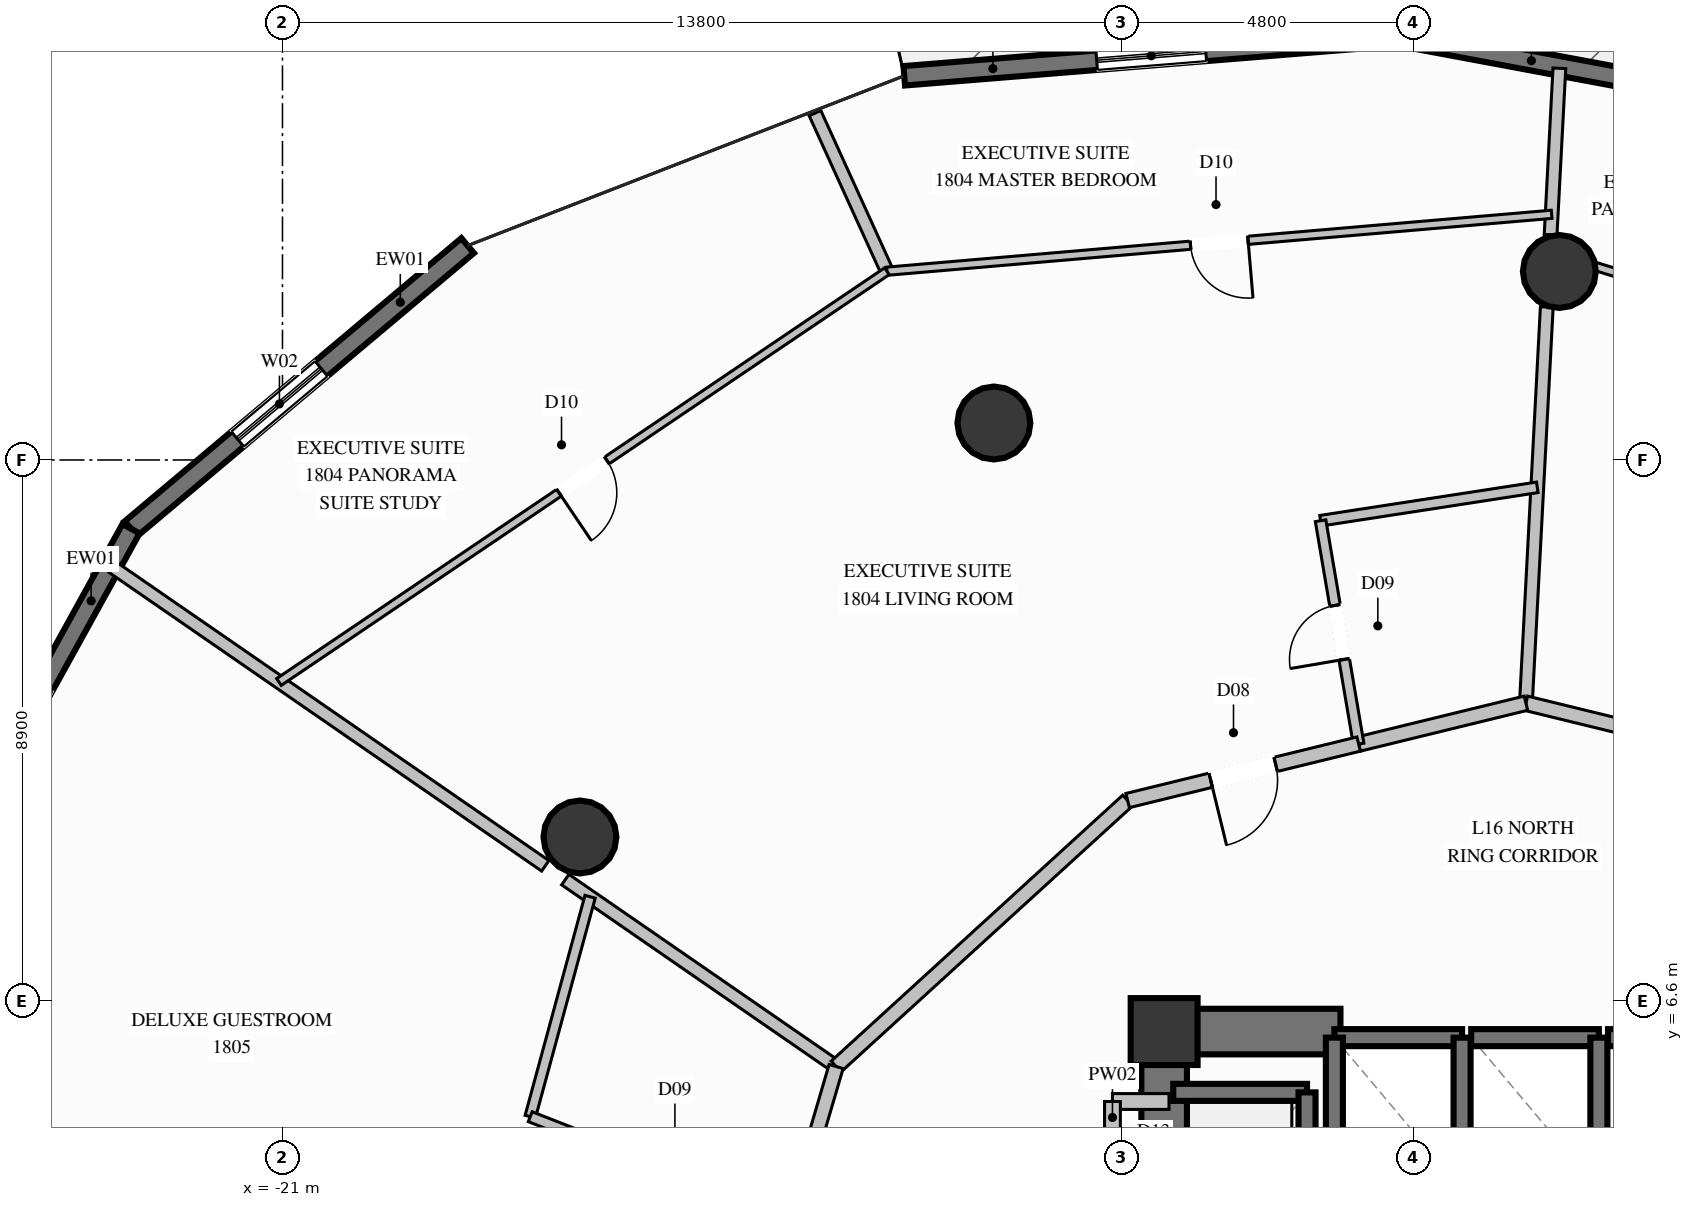
"""IFC4 building model, lengths in metres.
Left out: names, types, materials, properties, quantities, classifications, styles, units other than length and angle.
Written with IfcOpenShell. Run it as: python <this file> out.ifc"""

import sys

from ifc_helpers import new_model, si_unit, direction, frame, frame_2d, origin, origin_2d, place, context, subcontext, project, spatial, rectangle, circle, extrude, element, fill, save


model = new_model("IFC4")
c1 = context("Model", 3, precision=1e-05, world=origin(), true_north=direction((0.0, 1.0)))
c2 = subcontext(c1, "Body", "Model", "MODEL_VIEW")
j1 = project(units=[si_unit("LENGTHUNIT", "METRE"), si_unit("PLANEANGLEUNIT", "RADIAN")], contexts=[c1])
p1 = place(None, origin())
s1 = spatial("IfcSite", under=j1, at=p1, CompositionType="ELEMENT")
p2 = place(p1, origin())
s2 = spatial("IfcBuilding", under=s1, at=p2, CompositionType="ELEMENT")
p3 = place(p2, frame((0.0, 0.0, 68.0)))
s3 = spatial("IfcBuildingStorey", under=s2, at=p3, CompositionType="ELEMENT", Elevation=68.0)
p4 = place(p3, frame((-6.5, 6.1, 0.0), z_axis=(0.0, 0.0, 1.0), x_axis=(1.0, 0.0, 0.0)))
e1 = element("IfcColumn", 1, at=p4, inside=s3, PredefinedType="COLUMN", context=c2, shape_type="SweptSolid", body=[
    extrude(rectangle(XDim=1.1, YDim=1.1, at=origin_2d()), origin(), (0.0, 0.0, 1.0), 3.6),
])
p5 = place(p3, frame((-6.125, 6.1, 0.0), z_axis=(0.0, 0.0, 1.0), x_axis=(1.0, 0.0, 0.0)))
e2 = element("IfcWall", 2, at=p5, inside=s3, PredefinedType="SHEAR", context=c2, shape_type="SweptSolid", body=[
    extrude(rectangle(XDim=2.525, YDim=0.75, at=frame_2d((1.262, 0.0))), origin(), (0.0, 0.0, 1.0), 3.6),
])
p6 = place(p3, frame((-6.5, 2.35, 0.0), z_axis=(0.0, 0.0, 1.0), x_axis=(0.0, 1.0, 0.0)))
e3 = element("IfcWall", 3, at=p6, inside=s3, PredefinedType="SHEAR", context=c2, shape_type="SweptSolid", body=[
    extrude(rectangle(XDim=4.125, YDim=0.75, at=frame_2d((2.062, 0.0))), origin(), (0.0, 0.0, 1.0), 3.6),
])
for number, where, z_axis, x_axis in (
    (4, (0.0, 18.6, 0.0), (0.0, 0.0, 1.0), (1.0, 0.0, 0.0)),
    (5, (-9.3, 16.108, 0.0), (0.0, 0.0, 1.0), (1.0, 0.0, 0.0)),
    (6, (-16.108, 9.3, 0.0), (0.0, 0.0, 1.0), (1.0, 0.0, 0.0)),
):
    element("IfcColumn", number, at=place(p3, frame(where, z_axis=z_axis, x_axis=x_axis)), inside=s3, PredefinedType="COLUMN", context=c2, shape_type="SweptSolid", body=[
        extrude(circle(Radius=0.6, at=origin_2d()), origin(), (0.0, 0.0, 1.0), 3.6),
    ])
p7 = place(p3, frame((-2.651, 22.475, 0.0), z_axis=(0.0, 0.0, 1.0), x_axis=(0.983056664979, -0.183301918815, 0.0)))
e7 = element("IfcWall", 7, at=p7, inside=s3, PredefinedType="SOLIDWALL", context=c2, shape_type="SweptSolid", body=[
    extrude(rectangle(XDim=8.412, YDim=0.32, at=frame_2d((4.206, 0.0))), origin(), (0.0, 0.0, 1.0), 3.34),
])
p8 = place(p7, frame((4.708, 0.0, 0.35)))
e8 = element("IfcOpeningElement", 8, at=p8, cuts=e7, PredefinedType="OPENING", context=c2, shape_type="SweptSolid", body=[
    extrude(rectangle(XDim=1.8, YDim=2.6, at=frame_2d((0.9, 1.3))), frame((0.0, 0.17, 0.0), z_axis=(0.0, -1.0, 0.0), x_axis=(1.0, 0.0, 0.0)), (0.0, 0.0, 1.0), 0.34),
])
p9 = place(p3, frame((-10.774, 21.818, 0.0), z_axis=(0.0, 0.0, 1.0), x_axis=(0.996745267641, 0.08061557812, 0.0)))
e9 = element("IfcWall", 9, at=p9, inside=s3, PredefinedType="SOLIDWALL", context=c2, shape_type="SweptSolid", body=[
    extrude(rectangle(XDim=8.15, YDim=0.32, at=frame_2d((4.075, 0.0))), origin(), (0.0, 0.0, 1.0), 3.34),
])
p10 = place(p9, frame((3.175, 0.0, 0.35)))
e10 = element("IfcOpeningElement", 10, at=p10, cuts=e9, PredefinedType="OPENING", context=c2, shape_type="SweptSolid", body=[
    extrude(rectangle(XDim=1.8, YDim=2.6, at=frame_2d((0.9, 1.3))), frame((0.0, 0.17, 0.0), z_axis=(0.0, -1.0, 0.0), x_axis=(1.0, 0.0, 0.0)), (0.0, 0.0, 1.0), 0.34),
])
p11 = place(p3, frame((-23.491, 14.37, 0.0), z_axis=(0.0, 0.0, 1.0), x_axis=(0.765388915414, 0.643568029164, 0.0)))
e11 = element("IfcWall", 11, at=p11, inside=s3, PredefinedType="SOLIDWALL", context=c2, shape_type="SweptSolid", body=[
    extrude(rectangle(XDim=7.233, YDim=0.32, at=frame_2d((3.616, 0.0))), origin(), (0.0, 0.0, 1.0), 3.34),
])
p12 = place(p11, frame((2.289, 0.0, 0.35)))
e12 = element("IfcOpeningElement", 12, at=p12, cuts=e11, PredefinedType="OPENING", context=c2, shape_type="SweptSolid", body=[
    extrude(rectangle(XDim=1.8, YDim=2.6, at=frame_2d((0.9, 1.3))), frame((0.0, 0.17, 0.0), z_axis=(0.0, -1.0, 0.0), x_axis=(1.0, 0.0, 0.0)), (0.0, 0.0, 1.0), 0.34),
])
p13 = place(p3, frame((-26.84, 8.308, 0.0), z_axis=(0.0, 0.0, 1.0), x_axis=(0.483582354317, 0.875298867013, 0.0)))
e13 = element("IfcWall", 13, at=p13, inside=s3, PredefinedType="SOLIDWALL", context=c2, shape_type="SweptSolid", body=[
    extrude(rectangle(XDim=6.926, YDim=0.32, at=frame_2d((3.463, 0.0))), origin(), (0.0, 0.0, 1.0), 3.34),
])
p14 = place(p13, frame((2.163, 0.0, 0.35)))
e14 = element("IfcOpeningElement", 14, at=p14, cuts=e13, PredefinedType="OPENING", context=c2, shape_type="SweptSolid", body=[
    extrude(rectangle(XDim=1.8, YDim=2.6, at=frame_2d((0.9, 1.3))), frame((0.0, 0.17, 0.0), z_axis=(0.0, -1.0, 0.0), x_axis=(1.0, 0.0, 0.0)), (0.0, 0.0, 1.0), 0.34),
])
p15 = place(p3, frame((-1.6, 6.0, 0.0), z_axis=(0.0, 0.0, 1.0), x_axis=(-1.0, 0.0, 0.0)))
e15 = element("IfcWall", 15, at=p15, inside=s3, PredefinedType="SOLIDWALL", context=c2, shape_type="SweptSolid", body=[
    extrude(rectangle(XDim=2.1, YDim=0.28, at=frame_2d((1.05, 0.0))), origin(), (0.0, 0.0, 1.0), 3.34),
])
for number, where, z_axis, x_axis in (
    (16, (-3.7, 6.0, 0.0), (0.0, 0.0, 1.0), (0.0, -1.0, 0.0)),
    (17, (-1.6, 3.5, 0.0), (0.0, 0.0, 1.0), (0.0, 1.0, 0.0)),
):
    element("IfcWall", number, at=place(p3, frame(where, z_axis=z_axis, x_axis=x_axis)), inside=s3, PredefinedType="SOLIDWALL", context=c2, shape_type="SweptSolid", body=[
        extrude(rectangle(XDim=2.5, YDim=0.28, at=frame_2d((1.25, 0.0))), origin(), (0.0, 0.0, 1.0), 3.34),
    ])
p16 = place(p3, frame((0.65, 6.0, 0.0), z_axis=(0.0, 0.0, 1.0), x_axis=(-1.0, 0.0, 0.0)))
e18 = element("IfcWall", 18, at=p16, inside=s3, PredefinedType="SOLIDWALL", context=c2, shape_type="SweptSolid", body=[
    extrude(rectangle(XDim=2.1, YDim=0.28, at=frame_2d((1.05, 0.0))), origin(), (0.0, 0.0, 1.0), 3.34),
])
p17 = place(p3, frame((0.65, 3.5, 0.0), z_axis=(0.0, 0.0, 1.0), x_axis=(0.0, 1.0, 0.0)))
e19 = element("IfcWall", 19, at=p17, inside=s3, PredefinedType="SOLIDWALL", context=c2, shape_type="SweptSolid", body=[
    extrude(rectangle(XDim=2.5, YDim=0.28, at=frame_2d((1.25, 0.0))), origin(), (0.0, 0.0, 1.0), 3.34),
])
p18 = place(p3, frame((3.0, 6.0, 0.0), z_axis=(0.0, 0.0, 1.0), x_axis=(-1.0, 0.0, 0.0)))
e20 = element("IfcWall", 20, at=p18, inside=s3, PredefinedType="SOLIDWALL", context=c2, shape_type="SweptSolid", body=[
    extrude(rectangle(XDim=2.2, YDim=0.28, at=frame_2d((1.1, 0.0))), origin(), (0.0, 0.0, 1.0), 3.34),
])
p19 = place(p3, frame((-4.15, 5.1, 0.0), z_axis=(0.0, 0.0, 1.0), x_axis=(-1.0, 0.0, 0.0)))
e21 = element("IfcWall", 21, at=p19, inside=s3, PredefinedType="SOLIDWALL", context=c2, shape_type="SweptSolid", body=[
    extrude(rectangle(XDim=2.2, YDim=0.28, at=frame_2d((1.1, 0.0))), origin(), (0.0, 0.0, 1.0), 3.34),
])
p20 = place(p3, frame((-4.15, 2.4, 0.0), z_axis=(0.0, 0.0, 1.0), x_axis=(0.0, 1.0, 0.0)))
e22 = element("IfcWall", 22, at=p20, inside=s3, PredefinedType="SOLIDWALL", context=c2, shape_type="SweptSolid", body=[
    extrude(rectangle(XDim=2.7, YDim=0.28, at=frame_2d((1.35, 0.0))), origin(), (0.0, 0.0, 1.0), 3.34),
])
p21 = place(p3, frame((-7.35, 4.95, 0.0), z_axis=(0.0, 0.0, 1.0), x_axis=(1.0, 0.0, 0.0)))
e23 = element("IfcWall", 23, at=p21, inside=s3, PredefinedType="PARTITIONING", context=c2, shape_type="SweptSolid", body=[
    extrude(rectangle(XDim=0.93, YDim=0.26, at=frame_2d((0.465, 0.0))), origin(), (0.0, 0.0, 1.0), 3.34),
])
p22 = place(p3, frame((-7.35, 2.55, 0.0), z_axis=(0.0, 0.0, 1.0), x_axis=(0.0, 1.0, 0.0)))
e24 = element("IfcWall", 24, at=p22, inside=s3, PredefinedType="PARTITIONING", context=c2, shape_type="SweptSolid", body=[
    extrude(rectangle(XDim=2.4, YDim=0.26, at=frame_2d((1.2, 0.0))), origin(), (0.0, 0.0, 1.0), 2.425),
])
p23 = place(p22, frame((0.775, 0.0, 0.0)))
e25 = element("IfcOpeningElement", 25, at=p23, cuts=e24, PredefinedType="OPENING", context=c2, shape_type="SweptSolid", body=[
    extrude(rectangle(XDim=0.85, YDim=2.05, at=frame_2d((0.425, 1.025))), frame((0.0, 0.14, 0.0), z_axis=(0.0, -1.0, 0.0), x_axis=(1.0, 0.0, 0.0)), (0.0, 0.0, 1.0), 0.28),
])
p24 = place(p3, frame((-0.55, 11.5, 0.0), z_axis=(0.0, 0.0, 1.0), x_axis=(0.052578474705, 0.998616795371, 0.0)))
e26 = element("IfcWall", 26, at=p24, inside=s3, PredefinedType="PARTITIONING", context=c2, shape_type="SweptSolid", body=[
    extrude(rectangle(XDim=6.524, YDim=0.21, at=frame_2d((3.262, 0.0))), origin(), (0.0, 0.0, 1.0), 3.34),
])
p25 = place(p3, frame((-0.144, 19.203, 0.0), z_axis=(0.0, 0.0, 1.0), x_axis=(0.052535465428, 0.998619058937, 0.0)))
e27 = element("IfcWall", 27, at=p25, inside=s3, PredefinedType="PARTITIONING", context=c2, shape_type="SweptSolid", body=[
    extrude(rectangle(XDim=2.742, YDim=0.21, at=frame_2d((1.371, 0.0))), origin(), (0.0, 0.0, 1.0), 3.34),
])
p26 = place(p3, frame((-11.895, 5.525, 0.0), z_axis=(0.0, 0.0, 1.0), x_axis=(-0.823003351356, 0.56803651613, 0.0)))
e28 = element("IfcWall", 28, at=p26, inside=s3, PredefinedType="PARTITIONING", context=c2, shape_type="SweptSolid", body=[
    extrude(rectangle(XDim=5.412, YDim=0.21, at=frame_2d((2.706, 0.0))), origin(), (0.0, 0.0, 1.0), 3.34),
])
p27 = place(p3, frame((-16.678, 8.826, 0.0), z_axis=(0.0, 0.0, 1.0), x_axis=(-0.823003432382, 0.568036398735, 0.0)))
e29 = element("IfcWall", 29, at=p27, inside=s3, PredefinedType="PARTITIONING", context=c2, shape_type="SweptSolid", body=[
    extrude(rectangle(XDim=8.647, YDim=0.21, at=frame_2d((4.324, 0.0))), origin(), (0.0, 0.0, 1.0), 3.34),
])
p28 = place(p3, frame((6.0, 9.899, 0.0), z_axis=(0.0, 0.0, 1.0), x_axis=(-0.971400676792, 0.237446257348, 0.0)))
e30 = element("IfcWall", 30, at=p28, inside=s3, PredefinedType="PARTITIONING", context=c2, shape_type="SweptSolid", body=[
    extrude(rectangle(XDim=6.743, YDim=0.24, at=frame_2d((3.372, 0.0))), origin(), (0.0, 0.0, 1.0), 3.34),
])
p29 = place(p3, frame((9.324, 16.005, 0.0), z_axis=(0.0, 0.0, 1.0), x_axis=(-0.956059543069, 0.29317256029, 0.0)))
e31 = element("IfcWall", 31, at=p29, inside=s3, PredefinedType="PARTITIONING", context=c2, shape_type="SweptSolid", body=[
    extrude(rectangle(XDim=9.92, YDim=0.135, at=frame_2d((4.96, 0.0))), origin(), (0.0, 0.0, 1.0), 2.793),
])
p30 = place(p29, frame((4.485, 0.0, 0.0)))
e32 = element("IfcOpeningElement", 32, at=p30, cuts=e31, PredefinedType="OPENING", context=c2, shape_type="SweptSolid", body=[
    extrude(rectangle(XDim=0.95, YDim=2.1, at=frame_2d((0.475, 1.05))), frame((0.0, 0.078, 0.0), z_axis=(0.0, -1.0, 0.0), x_axis=(1.0, 0.0, 0.0)), (0.0, 0.0, 1.0), 0.155),
])
p31 = place(p3, frame((-0.55, 11.5, 0.0), z_axis=(0.0, 0.0, 1.0), x_axis=(-0.971426839663, -0.237339198579, 0.0)))
e33 = element("IfcWall", 33, at=p31, inside=s3, PredefinedType="PARTITIONING", context=c2, shape_type="SweptSolid", body=[
    extrude(rectangle(XDim=2.832, YDim=0.24, at=frame_2d((1.416, 0.0))), origin(), (0.0, 0.0, 1.0), 3.34),
])
p32 = place(p3, frame((-0.363, 15.05, 0.0), z_axis=(0.0, 0.0, 1.0), x_axis=(-0.988339584837, -0.152265771085, 0.0)))
e34 = element("IfcWall", 34, at=p32, inside=s3, PredefinedType="PLUMBINGWALL", context=c2, shape_type="SweptSolid", body=[
    extrude(rectangle(XDim=3.606, YDim=0.175, at=frame_2d((1.803, 0.0))), origin(), (0.0, 0.0, 1.0), 3.34),
])
p33 = place(p3, frame((-3.301, 10.828, 0.0), z_axis=(0.0, 0.0, 1.0), x_axis=(-0.167999861504, 0.985787018851, 0.0)))
e35 = element("IfcWall", 35, at=p33, inside=s3, PredefinedType="PLUMBINGWALL", context=c2, shape_type="SweptSolid", body=[
    extrude(rectangle(XDim=3.726, YDim=0.175, at=frame_2d((1.863, 0.0))), origin(), (0.0, 0.0, 1.0), 3.34),
])
p34 = place(p33, frame((1.413, 0.0, 0.0)))
e36 = element("IfcOpeningElement", 36, at=p34, cuts=e35, PredefinedType="OPENING", context=c2, shape_type="SweptSolid", body=[
    extrude(rectangle(XDim=0.9, YDim=2.1, at=frame_2d((0.45, 1.05))), frame((0.0, 0.098, 0.0), z_axis=(0.0, -1.0, 0.0), x_axis=(1.0, 0.0, 0.0)), (0.0, 0.0, 1.0), 0.195),
])
p35 = place(p3, frame((-11.059, 18.604, 0.0), z_axis=(0.0, 0.0, 1.0), x_axis=(-0.414092695147, 0.910234716887, 0.0)))
e37 = element("IfcWall", 37, at=p35, inside=s3, PredefinedType="PARTITIONING", context=c2, shape_type="SweptSolid", body=[
    extrude(rectangle(XDim=2.856, YDim=0.21, at=frame_2d((1.428, 0.0))), origin(), (0.0, 0.0, 1.0), 3.34),
])
p36 = place(p3, frame((-7.1, 9.899, 0.0), z_axis=(0.0, 0.0, 1.0), x_axis=(-0.73878836807, -0.673937495028, 0.0)))
e38 = element("IfcWall", 38, at=p36, inside=s3, PredefinedType="PARTITIONING", context=c2, shape_type="SweptSolid", body=[
    extrude(rectangle(XDim=6.49, YDim=0.24, at=frame_2d((3.245, 0.0))), origin(), (0.0, 0.0, 1.0), 3.34),
])
p37 = place(p3, frame((-3.301, 10.828, 0.0), z_axis=(0.0, 0.0, 1.0), x_axis=(-0.971381725301, -0.237523775128, 0.0)))
e39 = element("IfcWall", 39, at=p37, inside=s3, PredefinedType="PARTITIONING", context=c2, shape_type="SweptSolid", body=[
    extrude(rectangle(XDim=3.911, YDim=0.24, at=frame_2d((1.956, 0.0))), origin(), (0.0, 0.0, 1.0), 3.34),
])
p38 = place(p37, frame((1.405, 0.0, 0.0)))
e40 = element("IfcOpeningElement", 40, at=p38, cuts=e39, PredefinedType="OPENING", context=c2, shape_type="SweptSolid", body=[
    extrude(rectangle(XDim=1.1, YDim=2.3, at=frame_2d((0.55, 1.15))), frame((0.0, 0.13, 0.0), z_axis=(0.0, -1.0, 0.0), x_axis=(1.0, 0.0, 0.0)), (0.0, 0.0, 1.0), 0.26),
])
p39 = place(p3, frame((-0.127, 19.54, 0.0), z_axis=(0.0, 0.0, 1.0), x_axis=(-0.996354434544, -0.085310261781, 0.0)))
e41 = element("IfcWall", 41, at=p39, inside=s3, PredefinedType="PARTITIONING", context=c2, shape_type="SweptSolid", body=[
    extrude(rectangle(XDim=10.972, YDim=0.135, at=frame_2d((5.486, 0.0))), origin(), (0.0, 0.0, 1.0), 3.34),
])
p40 = place(p39, frame((5.011, 0.0, 0.0)))
e42 = element("IfcOpeningElement", 42, at=p40, cuts=e41, PredefinedType="OPENING", context=c2, shape_type="SweptSolid", body=[
    extrude(rectangle(XDim=0.95, YDim=2.1, at=frame_2d((0.475, 1.05))), frame((0.0, 0.078, 0.0), z_axis=(0.0, -1.0, 0.0), x_axis=(1.0, 0.0, 0.0)), (0.0, 0.0, 1.0), 0.155),
])
p41 = place(p3, frame((-11.059, 18.604, 0.0), z_axis=(0.0, 0.0, 1.0), x_axis=(-0.828635640213, -0.559788331219, 0.0)))
e43 = element("IfcWall", 43, at=p41, inside=s3, PredefinedType="PARTITIONING", context=c2, shape_type="SweptSolid", body=[
    extrude(rectangle(XDim=12.067, YDim=0.135, at=frame_2d((6.033, 0.0))), origin(), (0.0, 0.0, 1.0), 3.34),
])
p42 = place(p41, frame((5.558, 0.0, 0.0)))
e44 = element("IfcOpeningElement", 44, at=p42, cuts=e43, PredefinedType="OPENING", context=c2, shape_type="SweptSolid", body=[
    extrude(rectangle(XDim=0.95, YDim=2.1, at=frame_2d((0.475, 1.05))), frame((0.0, 0.078, 0.0), z_axis=(0.0, -1.0, 0.0), x_axis=(1.0, 0.0, 0.0)), (0.0, 0.0, 1.0), 0.155),
])
p43 = place(p3, frame((-11.895, 5.525, 0.0), z_axis=(0.0, 0.0, 1.0), x_axis=(-0.281878178616, -0.9594502032, 0.0)))
e45 = element("IfcWall", 45, at=p43, inside=s3, PredefinedType="PARTITIONING", context=c2, shape_type="SweptSolid", body=[
    extrude(rectangle(XDim=2.615, YDim=0.24, at=frame_2d((1.307, 0.0))), origin(), (0.0, 0.0, 1.0), 3.34),
])
p44 = place(p3, frame((-15.941, 8.317, 0.0), z_axis=(0.0, 0.0, 1.0), x_axis=(-0.262544204064, -0.964919966066, 0.0)))
e46 = element("IfcWall", 46, at=p44, inside=s3, PredefinedType="PLUMBINGWALL", context=c2, shape_type="SweptSolid", body=[
    extrude(rectangle(XDim=3.749, YDim=0.175, at=frame_2d((1.874, 0.0))), origin(), (0.0, 0.0, 1.0), 2.793),
])
p45 = place(p3, frame((-12.632, 3.016, 0.0), z_axis=(0.0, 0.0, 1.0), x_axis=(-0.930949556546, 0.365147810026, 0.0)))
e47 = element("IfcWall", 47, at=p45, inside=s3, PredefinedType="PLUMBINGWALL", context=c2, shape_type="SweptSolid", body=[
    extrude(rectangle(XDim=4.611, YDim=0.175, at=frame_2d((2.306, 0.0))), origin(), (0.0, 0.0, 1.0), 3.34),
])
p46 = place(p45, frame((1.856, 0.0, 0.0)))
e48 = element("IfcOpeningElement", 48, at=p46, cuts=e47, PredefinedType="OPENING", context=c2, shape_type="SweptSolid", body=[
    extrude(rectangle(XDim=0.9, YDim=2.1, at=frame_2d((0.45, 1.05))), frame((0.0, 0.098, 0.0), z_axis=(0.0, -1.0, 0.0), x_axis=(1.0, 0.0, 0.0)), (0.0, 0.0, 1.0), 0.195),
])
p47 = place(p10, origin())
e49 = element("IfcWindow", 49, at=p47, inside=s3, PartitioningType="SINGLE_PANEL", PredefinedType="WINDOW", context=c2, shape_type="SweptSolid", body=[
    extrude(rectangle(XDim=1.8, YDim=2.6, at=frame_2d((0.9, 1.3))), frame((0.0, 0.03, 0.0), z_axis=(0.0, -1.0, 0.0), x_axis=(1.0, 0.0, 0.0)), (0.0, 0.0, 1.0), 0.06),
])
fill(e10, e49)
p48 = place(p12, origin())
e50 = element("IfcWindow", 50, at=p48, inside=s3, PartitioningType="SINGLE_PANEL", PredefinedType="WINDOW", context=c2, shape_type="SweptSolid", body=[
    extrude(rectangle(XDim=1.8, YDim=2.6, at=frame_2d((0.9, 1.3))), frame((0.0, 0.03, 0.0), z_axis=(0.0, -1.0, 0.0), x_axis=(1.0, 0.0, 0.0)), (0.0, 0.0, 1.0), 0.06),
])
fill(e12, e50)
p49 = place(p34, origin())
e51 = element("IfcDoor", 51, at=p49, inside=s3, OperationType="SINGLE_SWING_LEFT", PredefinedType="DOOR", context=c2, shape_type="SweptSolid", body=[
    extrude(rectangle(XDim=0.9, YDim=2.1, at=frame_2d((0.45, 1.05))), frame((0.0, 0.025, 0.0), z_axis=(0.0, -1.0, 0.0), x_axis=(1.0, 0.0, 0.0)), (0.0, 0.0, 1.0), 0.05),
])
fill(e36, e51)
p50 = place(p38, origin())
e52 = element("IfcDoor", 52, at=p50, inside=s3, OperationType="SINGLE_SWING_RIGHT", PredefinedType="DOOR", context=c2, shape_type="SweptSolid", body=[
    extrude(rectangle(XDim=1.1, YDim=2.3, at=frame_2d((0.55, 1.15))), frame((0.0, 0.025, 0.0), z_axis=(0.0, -1.0, 0.0), x_axis=(1.0, 0.0, 0.0)), (0.0, 0.0, 1.0), 0.05),
])
fill(e40, e52)
p51 = place(p40, origin())
e53 = element("IfcDoor", 53, at=p51, inside=s3, OperationType="SINGLE_SWING_LEFT", PredefinedType="DOOR", context=c2, shape_type="SweptSolid", body=[
    extrude(rectangle(XDim=0.95, YDim=2.1, at=frame_2d((0.475, 1.05))), frame((0.0, 0.025, 0.0), z_axis=(0.0, -1.0, 0.0), x_axis=(1.0, 0.0, 0.0)), (0.0, 0.0, 1.0), 0.05),
])
fill(e42, e53)
p52 = place(p42, origin())
e54 = element("IfcDoor", 54, at=p52, inside=s3, OperationType="SINGLE_SWING_RIGHT", PredefinedType="DOOR", context=c2, shape_type="SweptSolid", body=[
    extrude(rectangle(XDim=0.95, YDim=2.1, at=frame_2d((0.475, 1.05))), frame((0.0, 0.025, 0.0), z_axis=(0.0, -1.0, 0.0), x_axis=(1.0, 0.0, 0.0)), (0.0, 0.0, 1.0), 0.05),
])
fill(e44, e54)
save(model, sys.argv[1])
